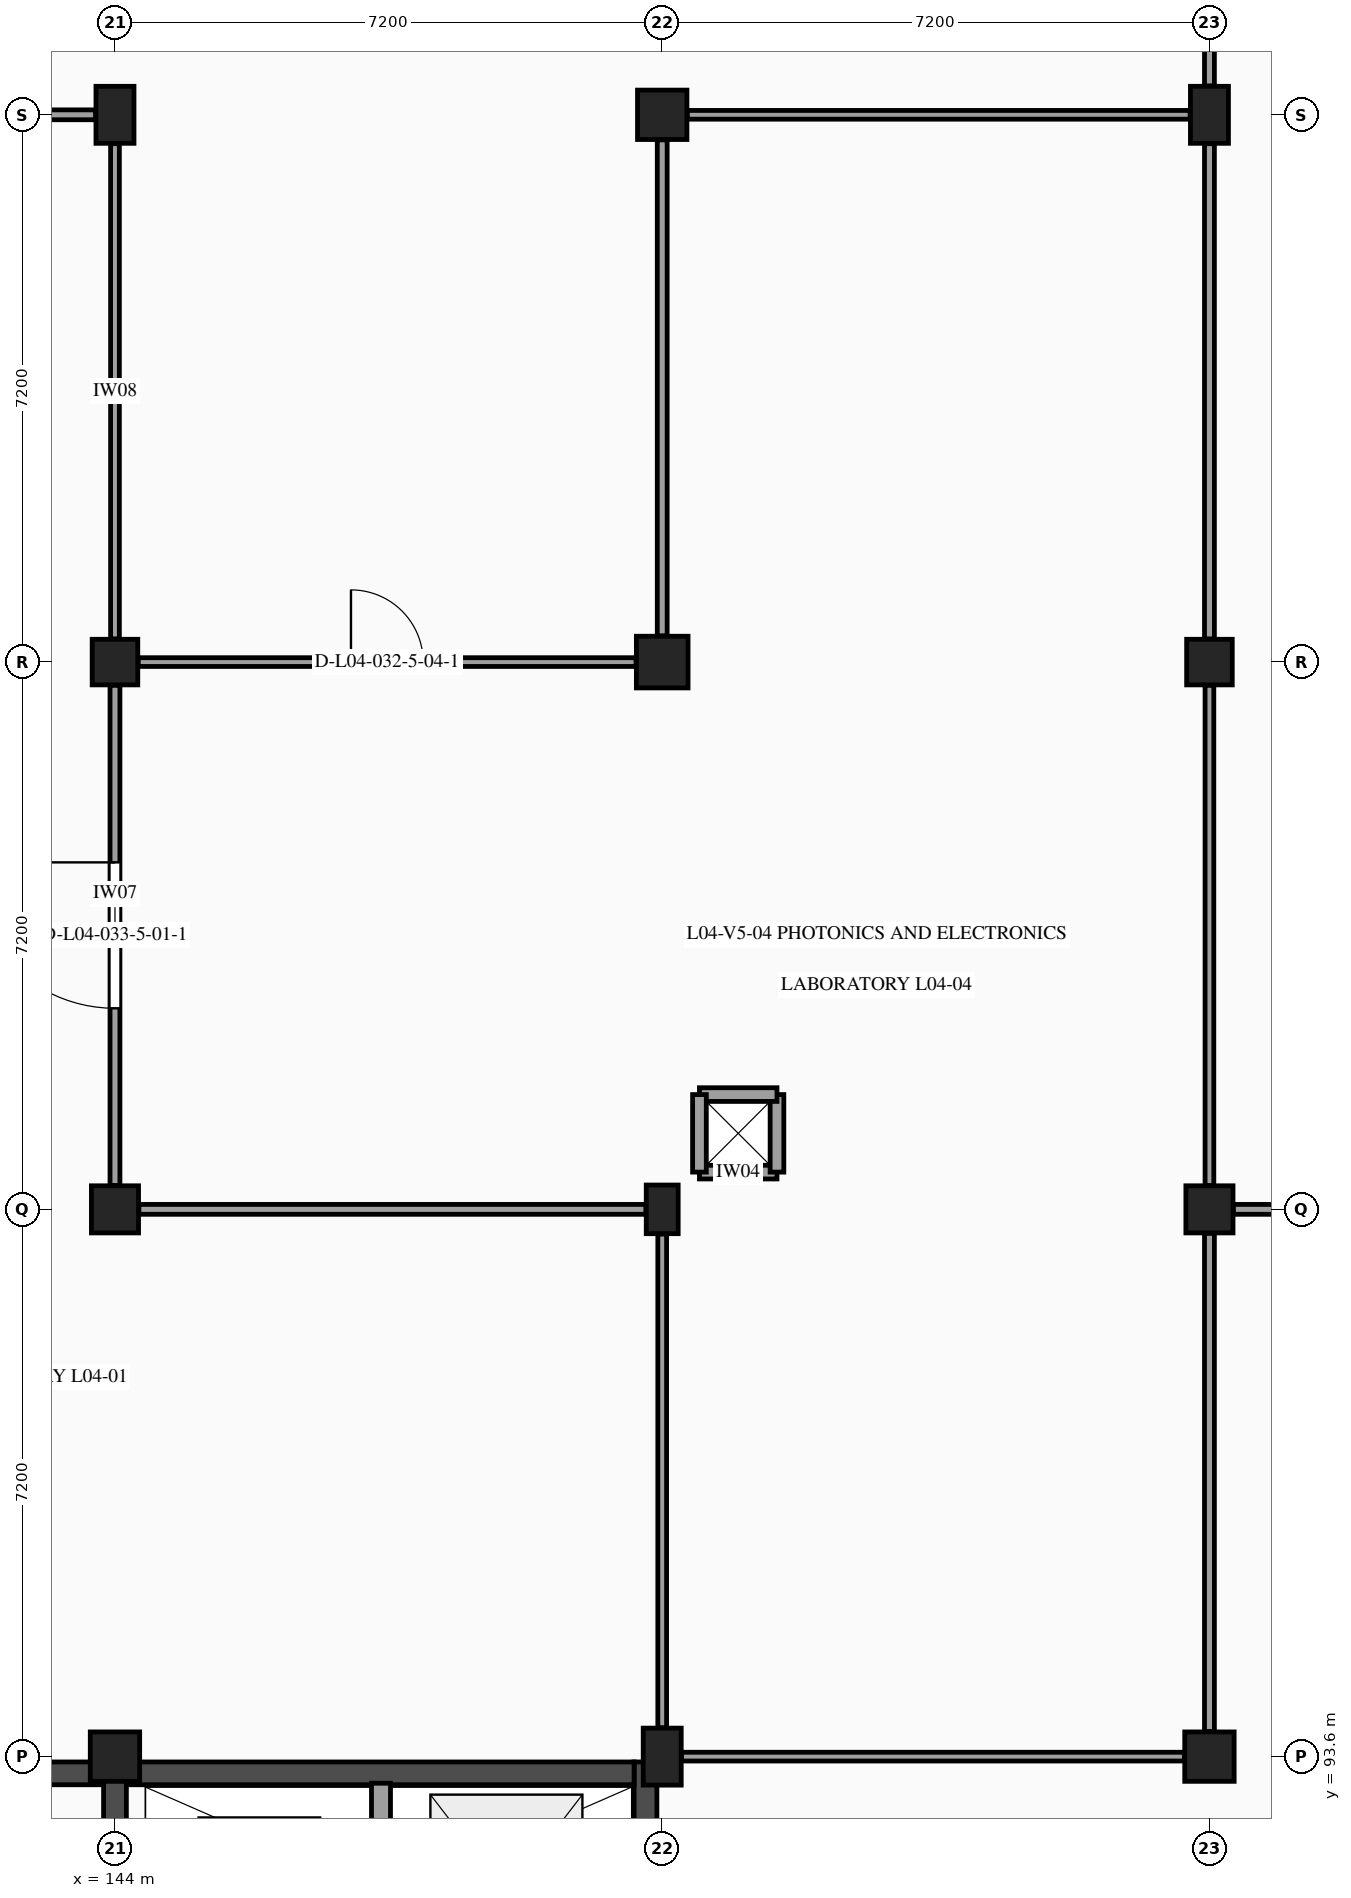
"""IFC4 building model, lengths in metres.
Left out: names, types, materials, properties, quantities, classifications, styles, units other than length and angle.
Written with IfcOpenShell. Run it as: python <this file> out.ifc"""

import sys

from ifc_helpers import new_model, si_unit, direction, frame, frame_2d, origin, origin_2d, place, context, subcontext, project, spatial, rectangle, extrude, element, fill, save


model = new_model("IFC4")
c1 = context("Model", 3, precision=1e-05, world=origin(), true_north=direction((0.0, 1.0)))
c2 = subcontext(c1, "Body", "Model", "MODEL_VIEW")
j1 = project(units=[si_unit("LENGTHUNIT", "METRE"), si_unit("PLANEANGLEUNIT", "RADIAN")], contexts=[c1])
p1 = place(None, origin())
s1 = spatial("IfcSite", under=j1, at=p1, CompositionType="ELEMENT")
p2 = place(p1, origin())
s2 = spatial("IfcBuilding", under=s1, at=p2, CompositionType="ELEMENT")
p3 = place(p2, frame((0.0, 0.0, 18.6)))
s3 = spatial("IfcBuildingStorey", under=s2, at=p3, CompositionType="ELEMENT", Elevation=18.6)
p4 = place(p3, frame((144.0, 93.6, 0.0), z_axis=(0.0, 0.0, 1.0), x_axis=(1.0, 0.0, 0.0)))
e1 = element("IfcColumn", 1, at=p4, inside=s3, PredefinedType="COLUMN", context=c2, shape_type="SweptSolid", body=[
    extrude(rectangle(XDim=0.65, YDim=0.65, at=origin_2d()), origin(), (0.0, 0.0, 1.0), 4.2),
])
p5 = place(p3, frame((144.0, 100.8, 0.0), z_axis=(0.0, 0.0, 1.0), x_axis=(1.0, 0.0, 0.0)))
e2 = element("IfcColumn", 2, at=p5, inside=s3, PredefinedType="COLUMN", context=c2, shape_type="SweptSolid", body=[
    extrude(rectangle(XDim=0.62, YDim=0.62, at=origin_2d()), origin(), (0.0, 0.0, 1.0), 4.2),
])
p6 = place(p3, frame((144.0, 108.0, 0.0), z_axis=(0.0, 0.0, 1.0), x_axis=(1.0, 0.0, 0.0)))
e3 = element("IfcColumn", 3, at=p6, inside=s3, PredefinedType="COLUMN", context=c2, shape_type="SweptSolid", body=[
    extrude(rectangle(XDim=0.6, YDim=0.6, at=origin_2d()), origin(), (0.0, 0.0, 1.0), 4.2),
])
for number, where, z_axis, x_axis in (
    (4, (144.0, 115.2, 0.0), (0.0, 0.0, 1.0), (1.0, 0.0, 0.0)),
    (5, (151.2, 93.6, 0.0), (0.0, 0.0, 1.0), (1.0, 0.0, 0.0)),
):
    element("IfcColumn", number, at=place(p3, frame(where, z_axis=z_axis, x_axis=x_axis)), inside=s3, PredefinedType="COLUMN", context=c2, shape_type="SweptSolid", body=[
        extrude(rectangle(XDim=0.5, YDim=0.75, at=origin_2d()), origin(), (0.0, 0.0, 1.0), 4.2),
    ])
p7 = place(p3, frame((151.2, 100.8, 0.0), z_axis=(0.0, 0.0, 1.0), x_axis=(1.0, 0.0, 0.0)))
e6 = element("IfcColumn", 6, at=p7, inside=s3, PredefinedType="PILASTER", context=c2, shape_type="SweptSolid", body=[
    extrude(rectangle(XDim=0.42, YDim=0.64, at=origin_2d()), origin(), (0.0, 0.0, 1.0), 4.2),
])
p8 = place(p3, frame((151.2, 108.0, 0.0), z_axis=(0.0, 0.0, 1.0), x_axis=(1.0, 0.0, 0.0)))
e7 = element("IfcColumn", 7, at=p8, inside=s3, PredefinedType="COLUMN", context=c2, shape_type="SweptSolid", body=[
    extrude(rectangle(XDim=0.68, YDim=0.68, at=origin_2d()), origin(), (0.0, 0.0, 1.0), 4.2),
])
for number, where, z_axis, x_axis in (
    (8, (151.2, 115.2, 0.0), (0.0, 0.0, 1.0), (1.0, 0.0, 0.0)),
    (9, (158.4, 93.6, 0.0), (0.0, 0.0, 1.0), (1.0, 0.0, 0.0)),
):
    element("IfcColumn", number, at=place(p3, frame(where, z_axis=z_axis, x_axis=x_axis)), inside=s3, PredefinedType="COLUMN", context=c2, shape_type="SweptSolid", body=[
        extrude(rectangle(XDim=0.65, YDim=0.65, at=origin_2d()), origin(), (0.0, 0.0, 1.0), 4.2),
    ])
p9 = place(p3, frame((158.4, 100.8, 0.0), z_axis=(0.0, 0.0, 1.0), x_axis=(1.0, 0.0, 0.0)))
e10 = element("IfcColumn", 10, at=p9, inside=s3, PredefinedType="COLUMN", context=c2, shape_type="SweptSolid", body=[
    extrude(rectangle(XDim=0.62, YDim=0.62, at=origin_2d()), origin(), (0.0, 0.0, 1.0), 4.2),
])
p10 = place(p3, frame((158.4, 108.0, 0.0), z_axis=(0.0, 0.0, 1.0), x_axis=(1.0, 0.0, 0.0)))
e11 = element("IfcColumn", 11, at=p10, inside=s3, PredefinedType="COLUMN", context=c2, shape_type="SweptSolid", body=[
    extrude(rectangle(XDim=0.6, YDim=0.6, at=origin_2d()), origin(), (0.0, 0.0, 1.0), 4.2),
])
p11 = place(p3, frame((158.4, 115.2, 0.0), z_axis=(0.0, 0.0, 1.0), x_axis=(1.0, 0.0, 0.0)))
e12 = element("IfcColumn", 12, at=p11, inside=s3, PredefinedType="COLUMN", context=c2, shape_type="SweptSolid", body=[
    extrude(rectangle(XDim=0.5, YDim=0.75, at=origin_2d()), origin(), (0.0, 0.0, 1.0), 4.2),
])
p12 = place(p3, frame((137.17, 93.38, 0.0), z_axis=(0.0, 0.0, 1.0), x_axis=(1.0, 0.0, 0.0)))
e13 = element("IfcWall", 13, at=p12, inside=s3, PredefinedType="SHEAR", context=c2, shape_type="SweptSolid", body=[
    extrude(rectangle(XDim=6.68, YDim=0.3, at=frame_2d((3.34, 0.0))), origin(), (0.0, 0.0, 1.0), 3.955),
])
p13 = place(p12, frame((1.42, 0.0, 0.0)))
e14 = element("IfcOpeningElement", 14, at=p13, cuts=e13, PredefinedType="OPENING", context=c2, shape_type="SweptSolid", body=[
    extrude(rectangle(XDim=0.85, YDim=2.1, at=frame_2d((0.425, 1.05))), frame((0.0, 0.16, 0.0), z_axis=(0.0, -1.0, 0.0), x_axis=(1.0, 0.0, 0.0)), (0.0, 0.0, 1.0), 0.32),
])
p14 = place(p12, frame((3.4, 0.0, 0.0)))
e15 = element("IfcOpeningElement", 15, at=p14, cuts=e13, PredefinedType="OPENING", context=c2, shape_type="SweptSolid", body=[
    extrude(rectangle(XDim=0.95, YDim=2.15, at=frame_2d((0.475, 1.075))), frame((0.0, 0.16, 0.0), z_axis=(0.0, -1.0, 0.0), x_axis=(1.0, 0.0, 0.0)), (0.0, 0.0, 1.0), 0.32),
])
p15 = place(p3, frame((144.0, 86.47, 0.0), z_axis=(0.0, 0.0, 1.0), x_axis=(0.0, 1.0, 0.0)))
e16 = element("IfcWall", 16, at=p15, inside=s3, PredefinedType="SHEAR", context=c2, shape_type="SweptSolid", body=[
    extrude(rectangle(XDim=7.06, YDim=0.3, at=frame_2d((3.53, 0.0))), origin(), (0.0, 0.0, 1.0), 3.955),
])
p16 = place(p15, frame((1.4, 0.0, 0.0)))
e17 = element("IfcOpeningElement", 17, at=p16, cuts=e16, PredefinedType="OPENING", context=c2, shape_type="SweptSolid", body=[
    extrude(rectangle(XDim=1.8, YDim=2.2, at=frame_2d((0.9, 1.1))), frame((0.0, 0.16, 0.0), z_axis=(0.0, -1.0, 0.0), x_axis=(1.0, 0.0, 0.0)), (0.0, 0.0, 1.0), 0.32),
])
p17 = place(p3, frame((150.98, 86.47, 0.0), z_axis=(0.0, 0.0, 1.0), x_axis=(0.0, 1.0, 0.0)))
e18 = element("IfcWall", 18, at=p17, inside=s3, PredefinedType="SHEAR", context=c2, shape_type="SweptSolid", body=[
    extrude(rectangle(XDim=7.06, YDim=0.3, at=frame_2d((3.53, 0.0))), origin(), (0.0, 0.0, 1.0), 3.955),
])
p18 = place(p3, frame((144.15, 93.38, 0.0), z_axis=(0.0, 0.0, 1.0), x_axis=(1.0, 0.0, 0.0)))
e19 = element("IfcWall", 19, at=p18, inside=s3, PredefinedType="SHEAR", context=c2, shape_type="SweptSolid", body=[
    extrude(rectangle(XDim=6.68, YDim=0.3, at=frame_2d((3.34, 0.0))), origin(), (0.0, 0.0, 1.0), 3.955),
])
p19 = place(p3, frame((147.5, 90.38, 0.0), z_axis=(0.0, 0.0, 1.0), x_axis=(0.0, 1.0, 0.0)))
e20 = element("IfcWall", 20, at=p19, inside=s3, PredefinedType="PARTITIONING", context=c2, shape_type="SweptSolid", body=[
    extrude(rectangle(XDim=2.87, YDim=0.25, at=frame_2d((1.435, 0.0))), origin(), (0.0, 0.0, 1.0), 3.955),
])
for number, where, z_axis, x_axis in (
    (21, (151.69, 101.29, 0.0), (0.0, 0.0, 1.0), (1.0, 0.0, 0.0)),
    (22, (152.71, 101.29, 0.0), (0.0, 0.0, 1.0), (0.0, 1.0, 0.0)),
    (23, (152.71, 102.31, 0.0), (0.0, 0.0, 1.0), (-1.0, 0.0, 0.0)),
    (24, (151.69, 102.31, 0.0), (0.0, 0.0, 1.0), (0.0, -1.0, 0.0)),
):
    element("IfcWall", number, at=place(p3, frame(where, z_axis=z_axis, x_axis=x_axis)), inside=s3, PredefinedType="PARTITIONING", context=c2, shape_type="SweptSolid", body=[
        extrude(rectangle(XDim=1.02, YDim=0.18, at=frame_2d((0.51, 0.0))), origin(), (0.0, 0.0, 1.0), 3.955),
    ])
p20 = place(p3, frame((144.0, 101.115, 0.0), z_axis=(0.0, 0.0, 1.0), x_axis=(0.0, 1.0, 0.0)))
e25 = element("IfcWall", 25, at=p20, inside=s3, PredefinedType="PARTITIONING", context=c2, shape_type="SweptSolid", body=[
    extrude(rectangle(XDim=6.58, YDim=0.13, at=frame_2d((3.29, 0.0))), origin(), (0.0, 0.0, 1.0), 3.27),
])
p21 = place(p20, frame((2.33, 0.0, 0.0)))
e26 = element("IfcOpeningElement", 26, at=p21, cuts=e25, PredefinedType="OPENING", context=c2, shape_type="SweptSolid", body=[
    extrude(rectangle(XDim=1.92, YDim=2.35, at=frame_2d((0.96, 1.175))), frame((0.0, 0.075, 0.0), z_axis=(0.0, -1.0, 0.0), x_axis=(1.0, 0.0, 0.0)), (0.0, 0.0, 1.0), 0.15),
])
p22 = place(p3, frame((144.0, 108.305, 0.0), z_axis=(0.0, 0.0, 1.0), x_axis=(0.0, 1.0, 0.0)))
e27 = element("IfcWall", 27, at=p22, inside=s3, PredefinedType="PARTITIONING", context=c2, shape_type="SweptSolid", body=[
    extrude(rectangle(XDim=6.515, YDim=0.115, at=frame_2d((3.258, 0.0))), origin(), (0.0, 0.0, 1.0), 3.27),
])
p23 = place(p3, frame((137.13, 115.2, 0.0), z_axis=(0.0, 0.0, 1.0), x_axis=(1.0, 0.0, 0.0)))
e28 = element("IfcWall", 28, at=p23, inside=s3, PredefinedType="PARTITIONING", context=c2, shape_type="SweptSolid", body=[
    extrude(rectangle(XDim=6.615, YDim=0.13, at=frame_2d((3.308, 0.0))), origin(), (0.0, 0.0, 1.0), 3.24),
])
p24 = place(p3, frame((151.2, 93.98, 0.0), z_axis=(0.0, 0.0, 1.0), x_axis=(0.0, 1.0, 0.0)))
e29 = element("IfcWall", 29, at=p24, inside=s3, PredefinedType="PARTITIONING", context=c2, shape_type="SweptSolid", body=[
    extrude(rectangle(XDim=6.495, YDim=0.115, at=frame_2d((3.248, 0.0))), origin(), (0.0, 0.0, 1.0), 3.275),
])
p25 = place(p3, frame((144.315, 100.8, 0.0), z_axis=(0.0, 0.0, 1.0), x_axis=(1.0, 0.0, 0.0)))
e30 = element("IfcWall", 30, at=p25, inside=s3, PredefinedType="PARTITIONING", context=c2, shape_type="SweptSolid", body=[
    extrude(rectangle(XDim=6.67, YDim=0.13, at=frame_2d((3.335, 0.0))), origin(), (0.0, 0.0, 1.0), 3.245),
])
p26 = place(p3, frame((144.305, 108.0, 0.0), z_axis=(0.0, 0.0, 1.0), x_axis=(1.0, 0.0, 0.0)))
e31 = element("IfcWall", 31, at=p26, inside=s3, PredefinedType="PARTITIONING", context=c2, shape_type="SweptSolid", body=[
    extrude(rectangle(XDim=6.55, YDim=0.115, at=frame_2d((3.275, 0.0))), origin(), (0.0, 0.0, 1.0), 3.245),
])
p27 = place(p26, frame((2.8, 0.0, 0.0)))
e32 = element("IfcOpeningElement", 32, at=p27, cuts=e31, PredefinedType="OPENING", context=c2, shape_type="SweptSolid", body=[
    extrude(rectangle(XDim=0.95, YDim=2.15, at=frame_2d((0.475, 1.075))), frame((0.0, 0.067, 0.0), z_axis=(0.0, -1.0, 0.0), x_axis=(1.0, 0.0, 0.0)), (0.0, 0.0, 1.0), 0.135),
])
p28 = place(p3, frame((151.2, 108.345, 0.0), z_axis=(0.0, 0.0, 1.0), x_axis=(0.0, 1.0, 0.0)))
e33 = element("IfcWall", 33, at=p28, inside=s3, PredefinedType="PARTITIONING", context=c2, shape_type="SweptSolid", body=[
    extrude(rectangle(XDim=6.525, YDim=0.13, at=frame_2d((3.263, 0.0))), origin(), (0.0, 0.0, 1.0), 3.27),
])
p29 = place(p3, frame((151.455, 93.6, 0.0), z_axis=(0.0, 0.0, 1.0), x_axis=(1.0, 0.0, 0.0)))
e34 = element("IfcWall", 34, at=p29, inside=s3, PredefinedType="PARTITIONING", context=c2, shape_type="SweptSolid", body=[
    extrude(rectangle(XDim=6.615, YDim=0.115, at=frame_2d((3.308, 0.0))), origin(), (0.0, 0.0, 1.0), 3.265),
])
p30 = place(p3, frame((158.4, 93.93, 0.0), z_axis=(0.0, 0.0, 1.0), x_axis=(0.0, 1.0, 0.0)))
e35 = element("IfcWall", 35, at=p30, inside=s3, PredefinedType="PARTITIONING", context=c2, shape_type="SweptSolid", body=[
    extrude(rectangle(XDim=6.555, YDim=0.13, at=frame_2d((3.278, 0.0))), origin(), (0.0, 0.0, 1.0), 3.275),
])
p31 = place(p3, frame((158.4, 101.115, 0.0), z_axis=(0.0, 0.0, 1.0), x_axis=(0.0, 1.0, 0.0)))
e36 = element("IfcWall", 36, at=p31, inside=s3, PredefinedType="PARTITIONING", context=c2, shape_type="SweptSolid", body=[
    extrude(rectangle(XDim=6.58, YDim=0.115, at=frame_2d((3.29, 0.0))), origin(), (0.0, 0.0, 1.0), 3.27),
])
p32 = place(p3, frame((158.4, 108.305, 0.0), z_axis=(0.0, 0.0, 1.0), x_axis=(0.0, 1.0, 0.0)))
e37 = element("IfcWall", 37, at=p32, inside=s3, PredefinedType="PARTITIONING", context=c2, shape_type="SweptSolid", body=[
    extrude(rectangle(XDim=6.515, YDim=0.13, at=frame_2d((3.258, 0.0))), origin(), (0.0, 0.0, 1.0), 3.27),
])
p33 = place(p3, frame((151.53, 115.2, 0.0), z_axis=(0.0, 0.0, 1.0), x_axis=(1.0, 0.0, 0.0)))
e38 = element("IfcWall", 38, at=p33, inside=s3, PredefinedType="PARTITIONING", context=c2, shape_type="SweptSolid", body=[
    extrude(rectangle(XDim=6.615, YDim=0.115, at=frame_2d((3.308, 0.0))), origin(), (0.0, 0.0, 1.0), 3.265),
])
p34 = place(p3, frame((158.4, 115.58, 0.0), z_axis=(0.0, 0.0, 1.0), x_axis=(0.0, 1.0, 0.0)))
e39 = element("IfcWall", 39, at=p34, inside=s3, PredefinedType="PARTITIONING", context=c2, shape_type="SweptSolid", body=[
    extrude(rectangle(XDim=6.495, YDim=0.13, at=frame_2d((3.248, 0.0))), origin(), (0.0, 0.0, 1.0), 3.335),
])
p35 = place(p34, frame((2.698, 0.0, 0.0)))
e40 = element("IfcOpeningElement", 40, at=p35, cuts=e39, PredefinedType="OPENING", context=c2, shape_type="SweptSolid", body=[
    extrude(rectangle(XDim=1.1, YDim=2.15, at=frame_2d((0.55, 1.075))), frame((0.0, 0.075, 0.0), z_axis=(0.0, -1.0, 0.0), x_axis=(1.0, 0.0, 0.0)), (0.0, 0.0, 1.0), 0.15),
])
p36 = place(p3, frame((158.715, 100.8, 0.0), z_axis=(0.0, 0.0, 1.0), x_axis=(1.0, 0.0, 0.0)))
e41 = element("IfcWall", 41, at=p36, inside=s3, PredefinedType="PARTITIONING", context=c2, shape_type="SweptSolid", body=[
    extrude(rectangle(XDim=6.67, YDim=0.13, at=frame_2d((3.335, 0.0))), origin(), (0.0, 0.0, 1.0), 3.305),
])
p37 = place(p36, frame((2.555, 0.0, 0.0)))
e42 = element("IfcOpeningElement", 42, at=p37, cuts=e41, PredefinedType="OPENING", context=c2, shape_type="SweptSolid", body=[
    extrude(rectangle(XDim=1.56, YDim=2.25, at=frame_2d((0.78, 1.125))), frame((0.0, 0.075, 0.0), z_axis=(0.0, -1.0, 0.0), x_axis=(1.0, 0.0, 0.0)), (0.0, 0.0, 1.0), 0.15),
])
p38 = place(p27, origin())
e43 = element("IfcDoor", 43, at=p38, inside=s3, OperationType="SINGLE_SWING_LEFT", PredefinedType="DOOR", context=c2, shape_type="SweptSolid", body=[
    extrude(rectangle(XDim=0.95, YDim=2.15, at=frame_2d((0.475, 1.075))), frame((0.0, 0.025, 0.0), z_axis=(0.0, -1.0, 0.0), x_axis=(1.0, 0.0, 0.0)), (0.0, 0.0, 1.0), 0.05),
])
fill(e32, e43)
p39 = place(p21, origin())
e44 = element("IfcDoor", 44, at=p39, inside=s3, OperationType="SINGLE_SWING_RIGHT", PredefinedType="DOOR", context=c2, shape_type="SweptSolid", body=[
    extrude(rectangle(XDim=1.92, YDim=2.35, at=frame_2d((0.96, 1.175))), frame((0.0, 0.025, 0.0), z_axis=(0.0, -1.0, 0.0), x_axis=(1.0, 0.0, 0.0)), (0.0, 0.0, 1.0), 0.05),
])
fill(e26, e44)
save(model, sys.argv[1])
